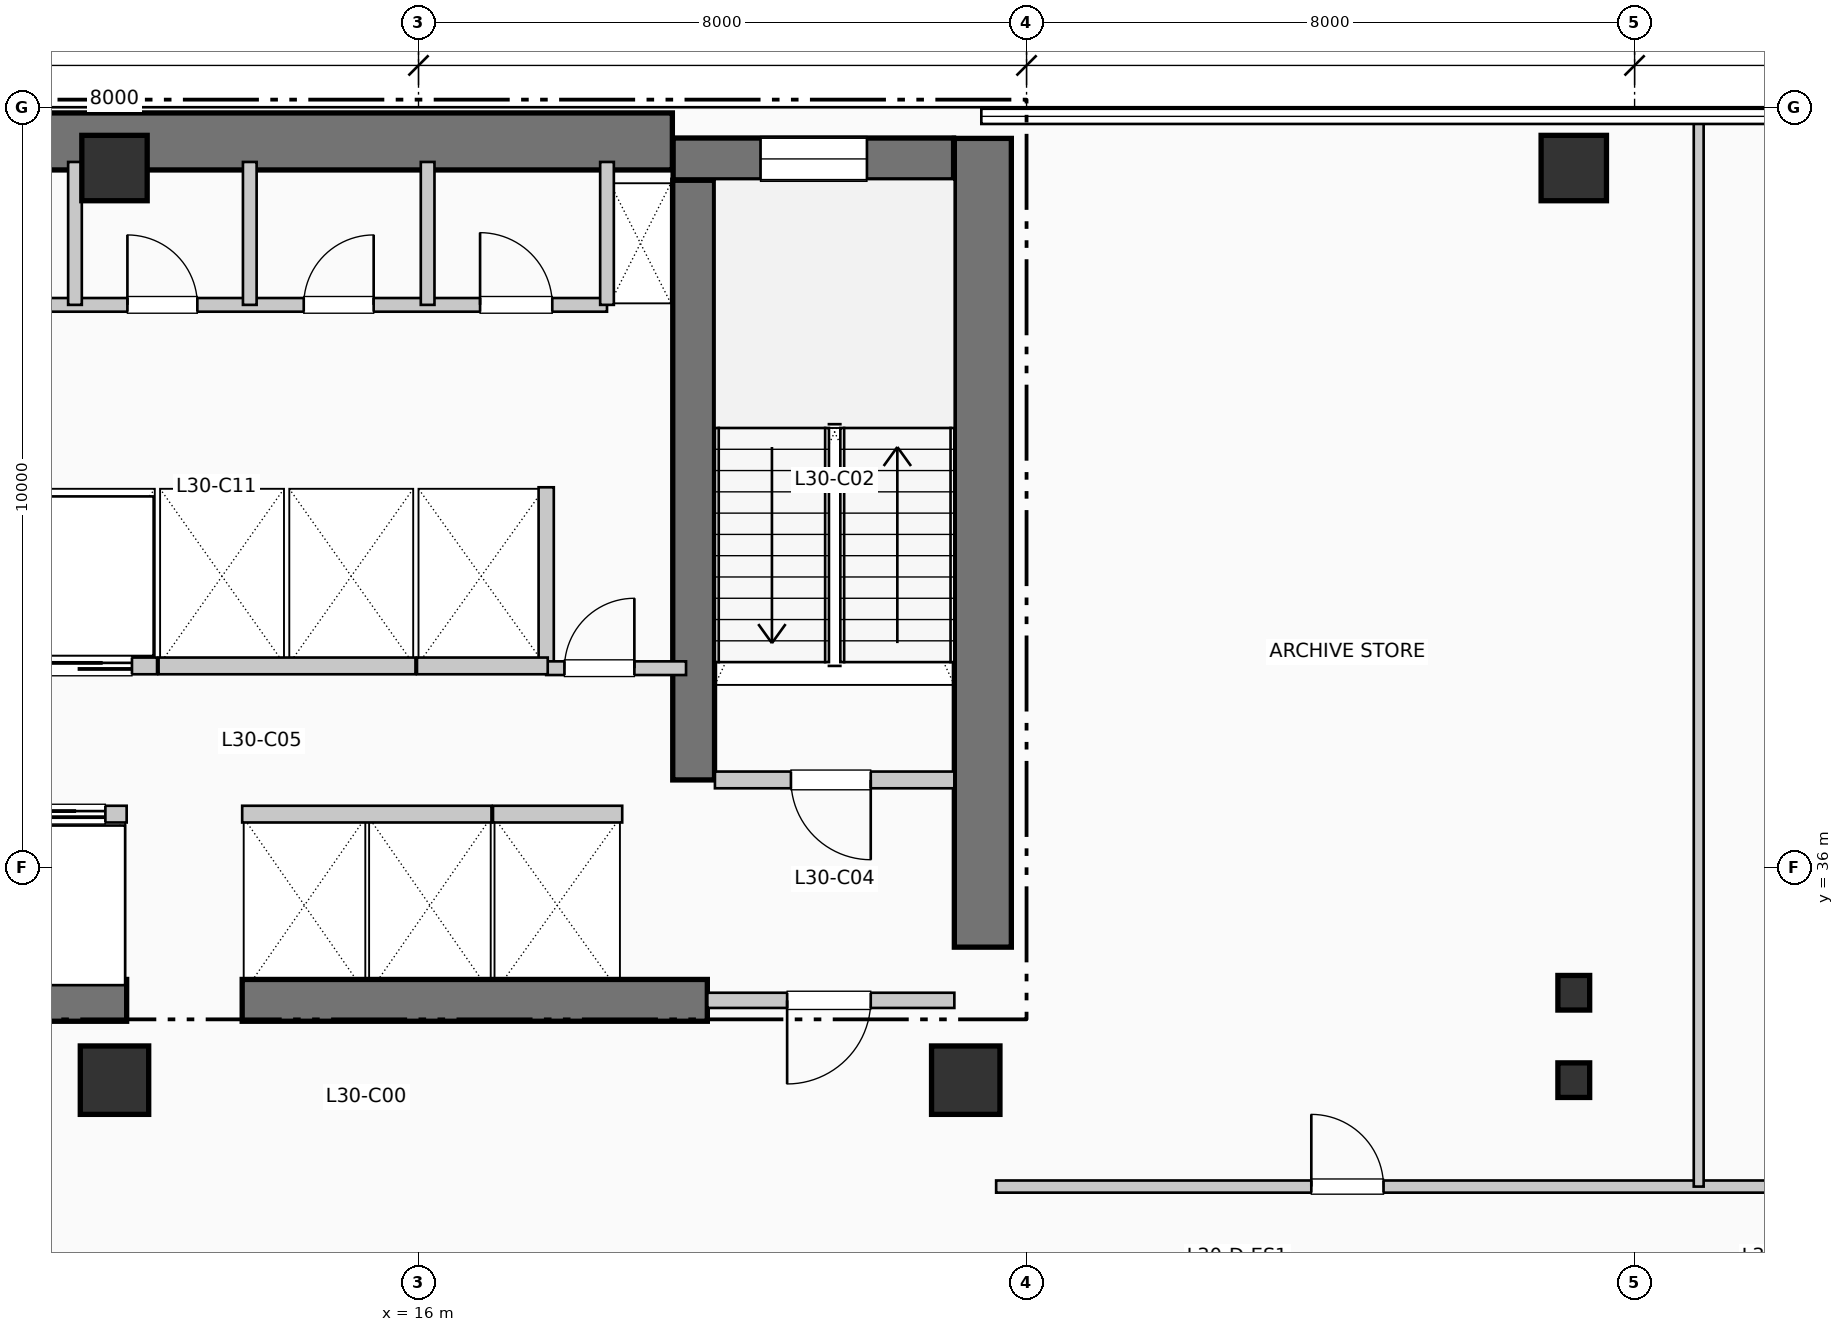
"""IFC4 building model, lengths in metres.
Left out: names, types, materials, properties, quantities, classifications, styles, units other than length and angle.
Written with IfcOpenShell. Run it as: python <this file> out.ifc"""

import sys

from ifc_helpers import new_model, si_unit, direction, frame, frame_2d, origin, origin_2d, place, context, subcontext, project, spatial, rectangle, i_section, extrude, element, fill, save


model = new_model("IFC4")
c1 = context("Model", 3, precision=1e-05, world=origin(), true_north=direction((0.0, 1.0)))
c2 = subcontext(c1, "Body", "Model", "MODEL_VIEW")
j1 = project(units=[si_unit("LENGTHUNIT", "METRE"), si_unit("PLANEANGLEUNIT", "RADIAN")], contexts=[c1])
p1 = place(None, origin())
s1 = spatial("IfcSite", under=j1, at=p1, CompositionType="ELEMENT")
p2 = place(p1, origin())
s2 = spatial("IfcBuilding", under=s1, at=p2, CompositionType="ELEMENT")
p3 = place(p2, frame((0.0, 0.0, 126.39)))
s3 = spatial("IfcBuildingStorey", under=s2, at=p3, CompositionType="ELEMENT", Elevation=126.39)
p4 = place(p3, frame((5.36, 45.55, 0.0), z_axis=(0.0, 0.0, 1.0), x_axis=(1.0, 0.0, 0.0)))
e1 = element("IfcWall", 1, at=p4, inside=s3, PredefinedType="SHEAR", context=c2, shape_type="SweptSolid", body=[
    extrude(rectangle(XDim=13.98, YDim=0.75, at=frame_2d((6.99, 0.0))), origin(), (0.0, 0.0, 1.0), 3.96),
])
p5 = place(p3, frame((23.425, 34.95, 0.0), z_axis=(0.0, 0.0, 1.0), x_axis=(0.0, 1.0, 0.0)))
e2 = element("IfcWall", 2, at=p5, inside=s3, PredefinedType="SHEAR", context=c2, shape_type="SweptSolid", body=[
    extrude(rectangle(XDim=10.64, YDim=0.75, at=frame_2d((5.32, 0.0))), origin(), (0.0, 0.0, 1.0), 3.96),
])
p6 = place(p3, frame((1.45, 34.25, 0.0), z_axis=(0.0, 0.0, 1.0), x_axis=(1.0, 0.0, 0.0)))
e3 = element("IfcWall", 3, at=p6, inside=s3, PredefinedType="SHEAR", context=c2, shape_type="SweptSolid", body=[
    extrude(rectangle(XDim=10.71, YDim=0.55, at=frame_2d((5.355, 0.0))), origin(), (0.0, 0.0, 1.0), 3.96),
])
p7 = place(p6, frame((7.25, 0.0, 0.0), z_axis=(0.0, 0.0, 1.0), x_axis=(-1.0, 0.0, 0.0)))
e4 = element("IfcOpeningElement", 4, at=p7, cuts=e3, PredefinedType="OPENING", context=c2, shape_type="SweptSolid", body=[
    extrude(rectangle(XDim=1.1, YDim=2.15, at=frame_2d((0.55, 1.075))), frame((0.0, 0.285, 0.0), z_axis=(0.0, -1.0, 0.0), x_axis=(1.0, 0.0, 0.0)), (0.0, 0.0, 1.0), 0.57),
])
p8 = place(p3, frame((13.68, 34.25, 0.0), z_axis=(0.0, 0.0, 1.0), x_axis=(1.0, 0.0, 0.0)))
e5 = element("IfcWall", 5, at=p8, inside=s3, PredefinedType="SHEAR", context=c2, shape_type="SweptSolid", body=[
    extrude(rectangle(XDim=6.12, YDim=0.55, at=frame_2d((3.06, 0.0))), origin(), (0.0, 0.0, 1.0), 3.96),
])
p9 = place(p3, frame((19.62, 37.15, 0.0), z_axis=(0.0, 0.0, 1.0), x_axis=(0.0, 1.0, 0.0)))
e6 = element("IfcWall", 6, at=p9, inside=s3, PredefinedType="SHEAR", context=c2, shape_type="SweptSolid", body=[
    extrude(rectangle(XDim=7.89, YDim=0.55, at=frame_2d((3.945, 0.0))), origin(), (0.0, 0.0, 1.0), 3.96),
])
p10 = place(p3, frame((19.35, 45.32, 0.0), z_axis=(0.0, 0.0, 1.0), x_axis=(1.0, 0.0, 0.0)))
e7 = element("IfcWall", 7, at=p10, inside=s3, PredefinedType="SHEAR", context=c2, shape_type="SweptSolid", body=[
    extrude(rectangle(XDim=3.69, YDim=0.55, at=frame_2d((1.845, 0.0))), origin(), (0.0, 0.0, 1.0), 3.96),
])
p11 = place(p10, frame((1.15, 0.0, 1.05)))
e8 = element("IfcOpeningElement", 8, at=p11, cuts=e7, PredefinedType="OPENING", context=c2, shape_type="SweptSolid", body=[
    extrude(rectangle(XDim=1.4, YDim=1.8, at=frame_2d((0.7, 0.9))), frame((0.0, 0.285, 0.0), z_axis=(0.0, -1.0, 0.0), x_axis=(1.0, 0.0, 0.0)), (0.0, 0.0, 1.0), 0.57),
])
p12 = place(p3, frame((12.0, 33.2, 0.0), z_axis=(0.0, 0.0, 1.0), x_axis=(1.0, 0.0, 0.0)))
e9 = element("IfcColumn", 9, at=p12, inside=s3, PredefinedType="COLUMN", context=c2, shape_type="SweptSolid", body=[
    extrude(rectangle(XDim=0.9, YDim=0.9, at=origin_2d()), origin(), (0.0, 0.0, 1.0), 3.96),
])
p13 = place(p3, frame((12.0, 45.2, 0.0), z_axis=(0.0, 0.0, 1.0), x_axis=(1.0, 0.0, 0.0)))
e10 = element("IfcColumn", 10, at=p13, inside=s3, PredefinedType="COLUMN", context=c2, shape_type="SweptSolid", body=[
    extrude(rectangle(XDim=0.86, YDim=0.86, at=origin_2d()), origin(), (0.0, 0.0, 1.0), 3.96),
])
p14 = place(p3, frame((23.2, 33.2, 0.0), z_axis=(0.0, 0.0, 1.0), x_axis=(1.0, 0.0, 0.0)))
e11 = element("IfcColumn", 11, at=p14, inside=s3, PredefinedType="COLUMN", context=c2, shape_type="SweptSolid", body=[
    extrude(rectangle(XDim=0.9, YDim=0.9, at=origin_2d()), origin(), (0.0, 0.0, 1.0), 3.96),
])
for number, where, z_axis, x_axis in (
    (12, (31.2, 33.2, 0.0), (0.0, 0.0, 1.0), (1.0, 0.0, 0.0)),
    (13, (31.2, 34.35, 0.0), (0.0, 0.0, 1.0), (1.0, 0.0, 0.0)),
):
    element("IfcColumn", number, at=place(p3, frame(where, z_axis=z_axis, x_axis=x_axis)), inside=s3, PredefinedType="COLUMN", context=c2, shape_type="SweptSolid", body=[
        extrude(i_section(OverallWidth=0.418, OverallDepth=0.455, WebThickness=0.032, FlangeThickness=0.051, at=origin_2d()), origin(), (0.0, 0.0, 1.0), 3.96),
    ])
p15 = place(p3, frame((31.2, 45.2, 0.0), z_axis=(0.0, 0.0, 1.0), x_axis=(1.0, 0.0, 0.0)))
e14 = element("IfcColumn", 14, at=p15, inside=s3, PredefinedType="COLUMN", context=c2, shape_type="SweptSolid", body=[
    extrude(rectangle(XDim=0.86, YDim=0.86, at=origin_2d()), origin(), (0.0, 0.0, 1.0), 3.96),
])
p16 = place(p3, frame((19.9, 37.15, 0.0), z_axis=(0.0, 0.0, 1.0), x_axis=(1.0, 0.0, 0.0)))
e15 = element("IfcWall", 15, at=p16, inside=s3, PredefinedType="PARTITIONING", context=c2, shape_type="SweptSolid", body=[
    extrude(rectangle(XDim=3.15, YDim=0.22, at=frame_2d((1.575, 0.0))), origin(), (0.0, 0.0, 1.0), 3.71),
])
p17 = place(p16, frame((2.05, 0.0, 0.0), z_axis=(0.0, 0.0, 1.0), x_axis=(-1.0, 0.0, 0.0)))
e16 = element("IfcOpeningElement", 16, at=p17, cuts=e15, PredefinedType="OPENING", context=c2, shape_type="SweptSolid", body=[
    extrude(rectangle(XDim=1.05, YDim=2.15, at=frame_2d((0.525, 1.075))), frame((0.0, 0.12, 0.0), z_axis=(0.0, -1.0, 0.0), x_axis=(1.0, 0.0, 0.0)), (0.0, 0.0, 1.0), 0.24),
])
p18 = place(p3, frame((19.8, 34.25, 0.0), z_axis=(0.0, 0.0, 1.0), x_axis=(1.0, 0.0, 0.0)))
e17 = element("IfcWall", 17, at=p18, inside=s3, PredefinedType="PARTITIONING", context=c2, shape_type="SweptSolid", body=[
    extrude(rectangle(XDim=3.25, YDim=0.2, at=frame_2d((1.625, 0.0))), origin(), (0.0, 0.0, 1.0), 3.71),
])
p19 = place(p18, frame((2.15, 0.0, 0.0), z_axis=(0.0, 0.0, 1.0), x_axis=(-1.0, 0.0, 0.0)))
e18 = element("IfcOpeningElement", 18, at=p19, cuts=e17, PredefinedType="OPENING", context=c2, shape_type="SweptSolid", body=[
    extrude(rectangle(XDim=1.1, YDim=2.15, at=frame_2d((0.55, 1.075))), frame((0.0, 0.11, 0.0), z_axis=(0.0, -1.0, 0.0), x_axis=(1.0, 0.0, 0.0)), (0.0, 0.0, 1.0), 0.22),
])
p20 = place(p3, frame((17.68, 38.65, 0.0), z_axis=(0.0, 0.0, 1.0), x_axis=(0.0, 1.0, 0.0)))
e19 = element("IfcWall", 19, at=p20, inside=s3, PredefinedType="PARTITIONING", context=c2, shape_type="SweptSolid", body=[
    extrude(rectangle(XDim=2.35, YDim=0.2, at=frame_2d((1.175, 0.0))), origin(), (0.0, 0.0, 1.0), 3.71),
])
p21 = place(p3, frame((17.68, 38.62, 0.0), z_axis=(0.0, 0.0, 1.0), x_axis=(1.0, 0.0, 0.0)))
e20 = element("IfcWall", 20, at=p21, inside=s3, PredefinedType="PARTITIONING", context=c2, shape_type="SweptSolid", body=[
    extrude(rectangle(XDim=1.84, YDim=0.18, at=frame_2d((0.92, 0.0))), origin(), (0.0, 0.0, 1.0), 3.71),
])
p22 = place(p21, frame((0.24, 0.0, 0.0)))
e21 = element("IfcOpeningElement", 21, at=p22, cuts=e20, PredefinedType="OPENING", context=c2, shape_type="SweptSolid", body=[
    extrude(rectangle(XDim=0.92, YDim=2.1, at=frame_2d((0.46, 1.05))), frame((0.0, 0.1, 0.0), z_axis=(0.0, -1.0, 0.0), x_axis=(1.0, 0.0, 0.0)), (0.0, 0.0, 1.0), 0.2),
])
p23 = place(p3, frame((8.9, 36.7, 0.0), z_axis=(0.0, 0.0, 1.0), x_axis=(1.0, 0.0, 0.0)))
e22 = element("IfcWall", 22, at=p23, inside=s3, PredefinedType="PARTITIONING", context=c2, shape_type="SweptSolid", body=[
    extrude(rectangle(XDim=3.26, YDim=0.22, at=frame_2d((1.63, 0.0))), origin(), (0.0, 0.0, 1.0), 3.71),
])
p24 = place(p23, frame((0.26, 0.0, 0.0)))
e23 = element("IfcOpeningElement", 23, at=p24, cuts=e22, PredefinedType="OPENING", context=c2, shape_type="SweptSolid", body=[
    extrude(rectangle(XDim=1.1, YDim=2.2, at=frame_2d((0.55, 1.1))), frame((0.0, 0.12, 0.0), z_axis=(0.0, -1.0, 0.0), x_axis=(1.0, 0.0, 0.0)), (0.0, 0.0, 1.0), 0.24),
])
p25 = place(p23, frame((1.88, 0.0, 0.0)))
e24 = element("IfcOpeningElement", 24, at=p25, cuts=e22, PredefinedType="OPENING", context=c2, shape_type="SweptSolid", body=[
    extrude(rectangle(XDim=1.1, YDim=2.2, at=frame_2d((0.55, 1.1))), frame((0.0, 0.12, 0.0), z_axis=(0.0, -1.0, 0.0), x_axis=(1.0, 0.0, 0.0)), (0.0, 0.0, 1.0), 0.24),
])
p26 = place(p3, frame((9.18, 38.65, 0.0), z_axis=(0.0, 0.0, 1.0), x_axis=(1.0, 0.0, 0.0)))
e25 = element("IfcWall", 25, at=p26, inside=s3, PredefinedType="PARTITIONING", context=c2, shape_type="SweptSolid", body=[
    extrude(rectangle(XDim=3.38, YDim=0.22, at=frame_2d((1.69, 0.0))), origin(), (0.0, 0.0, 1.0), 3.71),
])
p27 = place(p26, frame((0.3, 0.0, 0.0)))
e26 = element("IfcOpeningElement", 26, at=p27, cuts=e25, PredefinedType="OPENING", context=c2, shape_type="SweptSolid", body=[
    extrude(rectangle(XDim=1.1, YDim=2.2, at=frame_2d((0.55, 1.1))), frame((0.0, 0.12, 0.0), z_axis=(0.0, -1.0, 0.0), x_axis=(1.0, 0.0, 0.0)), (0.0, 0.0, 1.0), 0.24),
])
p28 = place(p26, frame((1.95, 0.0, 0.0)))
e27 = element("IfcOpeningElement", 27, at=p28, cuts=e25, PredefinedType="OPENING", context=c2, shape_type="SweptSolid", body=[
    extrude(rectangle(XDim=1.1, YDim=2.2, at=frame_2d((0.55, 1.1))), frame((0.0, 0.12, 0.0), z_axis=(0.0, -1.0, 0.0), x_axis=(1.0, 0.0, 0.0)), (0.0, 0.0, 1.0), 0.24),
])
p29 = place(p3, frame((13.68, 36.7, 0.0), z_axis=(0.0, 0.0, 1.0), x_axis=(1.0, 0.0, 0.0)))
e28 = element("IfcWall", 28, at=p29, inside=s3, PredefinedType="PARTITIONING", context=c2, shape_type="SweptSolid", body=[
    extrude(rectangle(XDim=3.28, YDim=0.22, at=frame_2d((1.64, 0.0))), origin(), (0.0, 0.0, 1.0), 3.71),
])
p30 = place(p3, frame((12.58, 38.65, 0.0), z_axis=(0.0, 0.0, 1.0), x_axis=(1.0, 0.0, 0.0)))
e29 = element("IfcWall", 29, at=p30, inside=s3, PredefinedType="PARTITIONING", context=c2, shape_type="SweptSolid", body=[
    extrude(rectangle(XDim=3.38, YDim=0.22, at=frame_2d((1.69, 0.0))), origin(), (0.0, 0.0, 1.0), 3.71),
])
p31 = place(p3, frame((16.98, 36.7, 0.0), z_axis=(0.0, 0.0, 1.0), x_axis=(1.0, 0.0, 0.0)))
e30 = element("IfcWall", 30, at=p31, inside=s3, PredefinedType="PARTITIONING", context=c2, shape_type="SweptSolid", body=[
    extrude(rectangle(XDim=1.7, YDim=0.22, at=frame_2d((0.85, 0.0))), origin(), (0.0, 0.0, 1.0), 3.71),
])
p32 = place(p3, frame((15.98, 38.65, 0.0), z_axis=(0.0, 0.0, 1.0), x_axis=(1.0, 0.0, 0.0)))
e31 = element("IfcWall", 31, at=p32, inside=s3, PredefinedType="PARTITIONING", context=c2, shape_type="SweptSolid", body=[
    extrude(rectangle(XDim=1.72, YDim=0.22, at=frame_2d((0.86, 0.0))), origin(), (0.0, 0.0, 1.0), 3.71),
])
p33 = place(p3, frame((9.15, 43.4, 0.0), z_axis=(0.0, 0.0, 1.0), x_axis=(1.0, 0.0, 0.0)))
e32 = element("IfcWall", 32, at=p33, inside=s3, PredefinedType="PLUMBINGWALL", context=c2, shape_type="SweptSolid", body=[
    extrude(rectangle(XDim=9.33, YDim=0.18, at=frame_2d((4.665, 0.0))), origin(), (0.0, 0.0, 1.0), 3.71),
])
p34 = place(p33, frame((0.72, 0.0, 0.0)))
e33 = element("IfcOpeningElement", 33, at=p34, cuts=e32, PredefinedType="OPENING", context=c2, shape_type="SweptSolid", body=[
    extrude(rectangle(XDim=0.92, YDim=2.1, at=frame_2d((0.46, 1.05))), frame((0.0, 0.1, 0.0), z_axis=(0.0, -1.0, 0.0), x_axis=(1.0, 0.0, 0.0)), (0.0, 0.0, 1.0), 0.2),
])
p35 = place(p33, frame((3.02, 0.0, 0.0)))
e34 = element("IfcOpeningElement", 34, at=p35, cuts=e32, PredefinedType="OPENING", context=c2, shape_type="SweptSolid", body=[
    extrude(rectangle(XDim=0.92, YDim=2.1, at=frame_2d((0.46, 1.05))), frame((0.0, 0.1, 0.0), z_axis=(0.0, -1.0, 0.0), x_axis=(1.0, 0.0, 0.0)), (0.0, 0.0, 1.0), 0.2),
])
p36 = place(p33, frame((5.34, 0.0, 0.0)))
e35 = element("IfcOpeningElement", 35, at=p36, cuts=e32, PredefinedType="OPENING", context=c2, shape_type="SweptSolid", body=[
    extrude(rectangle(XDim=0.92, YDim=2.1, at=frame_2d((0.46, 1.05))), frame((0.0, 0.1, 0.0), z_axis=(0.0, -1.0, 0.0), x_axis=(1.0, 0.0, 0.0)), (0.0, 0.0, 1.0), 0.2),
])
p37 = place(p33, frame((7.66, 0.0, 0.0)))
e36 = element("IfcOpeningElement", 36, at=p37, cuts=e32, PredefinedType="OPENING", context=c2, shape_type="SweptSolid", body=[
    extrude(rectangle(XDim=0.95, YDim=2.1, at=frame_2d((0.475, 1.05))), frame((0.0, 0.1, 0.0), z_axis=(0.0, -1.0, 0.0), x_axis=(1.0, 0.0, 0.0)), (0.0, 0.0, 1.0), 0.2),
])
for number, where, z_axis, x_axis in (
    (37, (18.48, 43.4, 0.0), (0.0, 0.0, 1.0), (0.0, 1.0, 0.0)),
    (38, (11.48, 43.4, 0.0), (0.0, 0.0, 1.0), (0.0, 1.0, 0.0)),
    (39, (13.78, 43.4, 0.0), (0.0, 0.0, 1.0), (0.0, 1.0, 0.0)),
    (40, (16.12, 43.4, 0.0), (0.0, 0.0, 1.0), (0.0, 1.0, 0.0)),
):
    element("IfcWall", number, at=place(p3, frame(where, z_axis=z_axis, x_axis=x_axis)), inside=s3, PredefinedType="PLUMBINGWALL", context=c2, shape_type="SweptSolid", body=[
        extrude(rectangle(XDim=1.88, YDim=0.18, at=frame_2d((0.94, 0.0))), origin(), (0.0, 0.0, 1.0), 3.71),
    ])
p38 = place(p3, frame((23.6, 31.8, 0.0), z_axis=(0.0, 0.0, 1.0), x_axis=(1.0, 0.0, 0.0)))
e41 = element("IfcWall", 41, at=p38, inside=s3, PredefinedType="PARTITIONING", context=c2, shape_type="SweptSolid", body=[
    extrude(rectangle(XDim=26.41, YDim=0.16, at=frame_2d((13.205, 0.0))), origin(), (0.0, 0.0, 1.0), 3.71),
])
p39 = place(p38, frame((4.147, 0.0, 0.0)))
e42 = element("IfcOpeningElement", 42, at=p39, cuts=e41, PredefinedType="OPENING", context=c2, shape_type="SweptSolid", body=[
    extrude(rectangle(XDim=0.95, YDim=2.15, at=frame_2d((0.475, 1.075))), frame((0.0, 0.09, 0.0), z_axis=(0.0, -1.0, 0.0), x_axis=(1.0, 0.0, 0.0)), (0.0, 0.0, 1.0), 0.18),
])
p40 = place(p38, frame((13.39, 0.0, 0.0)))
e43 = element("IfcOpeningElement", 43, at=p40, cuts=e41, PredefinedType="OPENING", context=c2, shape_type="SweptSolid", body=[
    extrude(rectangle(XDim=0.95, YDim=2.15, at=frame_2d((0.475, 1.075))), frame((0.0, 0.09, 0.0), z_axis=(0.0, -1.0, 0.0), x_axis=(1.0, 0.0, 0.0)), (0.0, 0.0, 1.0), 0.18),
])
p41 = place(p38, frame((21.973, 0.0, 0.0)))
e44 = element("IfcOpeningElement", 44, at=p41, cuts=e41, PredefinedType="OPENING", context=c2, shape_type="SweptSolid", body=[
    extrude(rectangle(XDim=0.95, YDim=2.15, at=frame_2d((0.475, 1.075))), frame((0.0, 0.09, 0.0), z_axis=(0.0, -1.0, 0.0), x_axis=(1.0, 0.0, 0.0)), (0.0, 0.0, 1.0), 0.18),
])
p42 = place(p3, frame((32.844, 31.8, 0.0), z_axis=(0.0, 0.0, 1.0), x_axis=(0.0, 1.0, 0.0)))
e45 = element("IfcWall", 45, at=p42, inside=s3, PredefinedType="PARTITIONING", context=c2, shape_type="SweptSolid", body=[
    extrude(rectangle(XDim=14.01, YDim=0.13, at=frame_2d((7.005, 0.0))), origin(), (0.0, 0.0, 1.0), 3.71),
])
p43 = place(p11, origin())
e46 = element("IfcWindow", 46, at=p43, inside=s3, PartitioningType="SINGLE_PANEL", PredefinedType="WINDOW", context=c2, shape_type="SweptSolid", body=[
    extrude(rectangle(XDim=1.4, YDim=1.8, at=frame_2d((0.7, 0.9))), frame((0.0, 0.03, 0.0), z_axis=(0.0, -1.0, 0.0), x_axis=(1.0, 0.0, 0.0)), (0.0, 0.0, 1.0), 0.06),
])
fill(e8, e46)
p44 = place(p17, origin())
e47 = element("IfcDoor", 47, at=p44, inside=s3, OperationType="SINGLE_SWING_RIGHT", PredefinedType="DOOR", context=c2, shape_type="SweptSolid", body=[
    extrude(rectangle(XDim=1.05, YDim=2.15, at=frame_2d((0.525, 1.075))), frame((0.0, 0.025, 0.0), z_axis=(0.0, -1.0, 0.0), x_axis=(1.0, 0.0, 0.0)), (0.0, 0.0, 1.0), 0.05),
])
fill(e16, e47)
p45 = place(p19, origin())
e48 = element("IfcDoor", 48, at=p45, inside=s3, OperationType="SINGLE_SWING_LEFT", PredefinedType="DOOR", context=c2, shape_type="SweptSolid", body=[
    extrude(rectangle(XDim=1.1, YDim=2.15, at=frame_2d((0.55, 1.075))), frame((0.0, 0.025, 0.0), z_axis=(0.0, -1.0, 0.0), x_axis=(1.0, 0.0, 0.0)), (0.0, 0.0, 1.0), 0.05),
])
fill(e18, e48)
p46 = place(p22, origin())
e49 = element("IfcDoor", 49, at=p46, inside=s3, OperationType="SINGLE_SWING_RIGHT", PredefinedType="DOOR", context=c2, shape_type="SweptSolid", body=[
    extrude(rectangle(XDim=0.92, YDim=2.1, at=frame_2d((0.46, 1.05))), frame((0.0, 0.025, 0.0), z_axis=(0.0, -1.0, 0.0), x_axis=(1.0, 0.0, 0.0)), (0.0, 0.0, 1.0), 0.05),
])
fill(e21, e49)
p47 = place(p25, origin())
e50 = element("IfcDoor", 50, at=p47, inside=s3, OperationType="SLIDING_TO_LEFT", PredefinedType="DOOR", context=c2, shape_type="SweptSolid", body=[
    extrude(rectangle(XDim=1.1, YDim=2.2, at=frame_2d((0.55, 1.1))), frame((0.0, 0.025, 0.0), z_axis=(0.0, -1.0, 0.0), x_axis=(1.0, 0.0, 0.0)), (0.0, 0.0, 1.0), 0.05),
])
fill(e24, e50)
p48 = place(p28, origin())
e51 = element("IfcDoor", 51, at=p48, inside=s3, OperationType="SLIDING_TO_LEFT", PredefinedType="DOOR", context=c2, shape_type="SweptSolid", body=[
    extrude(rectangle(XDim=1.1, YDim=2.2, at=frame_2d((0.55, 1.1))), frame((0.0, 0.025, 0.0), z_axis=(0.0, -1.0, 0.0), x_axis=(1.0, 0.0, 0.0)), (0.0, 0.0, 1.0), 0.05),
])
fill(e27, e51)
p49 = place(p35, origin())
e52 = element("IfcDoor", 52, at=p49, inside=s3, OperationType="SINGLE_SWING_LEFT", PredefinedType="DOOR", context=c2, shape_type="SweptSolid", body=[
    extrude(rectangle(XDim=0.92, YDim=2.1, at=frame_2d((0.46, 1.05))), frame((0.0, 0.025, 0.0), z_axis=(0.0, -1.0, 0.0), x_axis=(1.0, 0.0, 0.0)), (0.0, 0.0, 1.0), 0.05),
])
fill(e34, e52)
p50 = place(p36, origin())
e53 = element("IfcDoor", 53, at=p50, inside=s3, OperationType="SINGLE_SWING_RIGHT", PredefinedType="DOOR", context=c2, shape_type="SweptSolid", body=[
    extrude(rectangle(XDim=0.92, YDim=2.1, at=frame_2d((0.46, 1.05))), frame((0.0, 0.025, 0.0), z_axis=(0.0, -1.0, 0.0), x_axis=(1.0, 0.0, 0.0)), (0.0, 0.0, 1.0), 0.05),
])
fill(e35, e53)
p51 = place(p37, origin())
e54 = element("IfcDoor", 54, at=p51, inside=s3, OperationType="SINGLE_SWING_LEFT", PredefinedType="DOOR", context=c2, shape_type="SweptSolid", body=[
    extrude(rectangle(XDim=0.95, YDim=2.1, at=frame_2d((0.475, 1.05))), frame((0.0, 0.025, 0.0), z_axis=(0.0, -1.0, 0.0), x_axis=(1.0, 0.0, 0.0)), (0.0, 0.0, 1.0), 0.05),
])
fill(e36, e54)
p52 = place(p39, origin())
e55 = element("IfcDoor", 55, at=p52, inside=s3, OperationType="SINGLE_SWING_LEFT", PredefinedType="DOOR", context=c2, shape_type="SweptSolid", body=[
    extrude(rectangle(XDim=0.95, YDim=2.15, at=frame_2d((0.475, 1.075))), frame((0.0, 0.025, 0.0), z_axis=(0.0, -1.0, 0.0), x_axis=(1.0, 0.0, 0.0)), (0.0, 0.0, 1.0), 0.05),
])
fill(e42, e55)
save(model, sys.argv[1])
